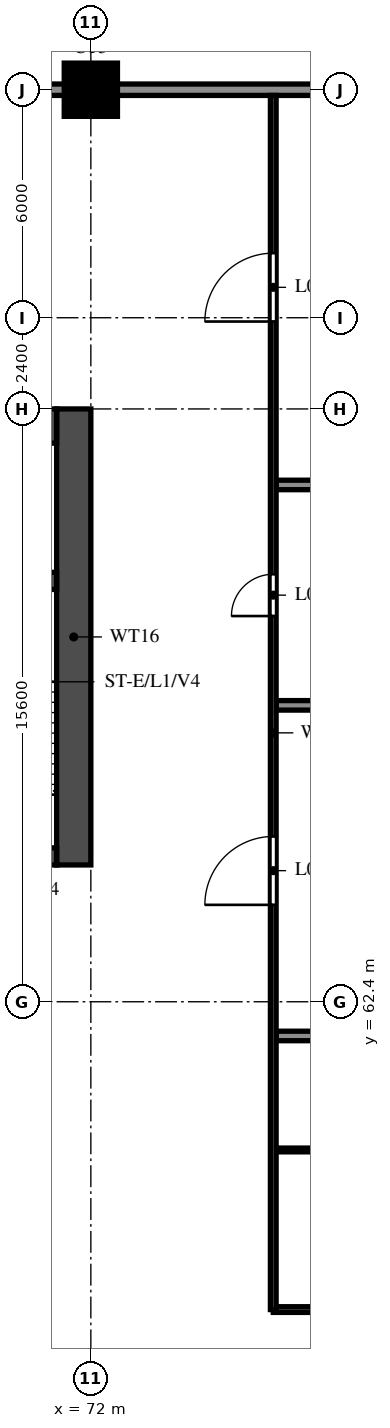
"""IFC4 building model, lengths in metres.
Left out: names, types, materials, properties, quantities, classifications, styles, units other than length and angle.
Written with IfcOpenShell. Run it as: python <this file> out.ifc"""

import sys

from ifc_helpers import new_model, si_unit, direction, frame, frame_2d, origin, origin_2d, place, context, subcontext, project, spatial, rectangle, circle, extrude, source, transform, mapped, element, fill, save


model = new_model("IFC4")
c1 = context("Model", 3, precision=1e-05, world=origin(), true_north=direction((0.0, 1.0)))
c2 = subcontext(c1, "Body", "Model", "MODEL_VIEW")
j1 = project(units=[si_unit("LENGTHUNIT", "METRE"), si_unit("PLANEANGLEUNIT", "RADIAN")], contexts=[c1])
p1 = place(None, origin())
s1 = spatial("IfcSite", under=j1, at=p1, CompositionType="ELEMENT")
p2 = place(p1, origin())
s2 = spatial("IfcBuilding", under=s1, at=p2, CompositionType="ELEMENT")
p3 = place(p2, frame((0.0, 0.0, 17.4)))
s3 = spatial("IfcBuildingStorey", under=s2, at=p3, CompositionType="ELEMENT", Elevation=17.4)
m1 = source(origin(), c2, "Body", "SweptSolid", [
    extrude(circle(Radius=0.7, at=origin_2d()), origin(), (0.0, 0.0, 1.0), 3.8),
])
p4 = place(p3, frame((72.0, 86.4, 0.0), z_axis=(0.0, 0.0, 1.0), x_axis=(1.0, 0.0, 0.0)))
e1 = element("IfcColumn", 1, at=p4, inside=s3, PredefinedType="COLUMN", context=c2, shape_type="MappedRepresentation", body=[
    mapped(m1, transform((0.0, 0.0, 0.0))),
])
p5 = place(p3, frame((71.55, 66.0, 0.0), z_axis=(0.0, 0.0, 1.0), x_axis=(0.0, 1.0, 0.0)))
e2 = element("IfcWall", 2, at=p5, inside=s3, PredefinedType="SHEAR", context=c2, shape_type="SweptSolid", body=[
    extrude(rectangle(XDim=12.0, YDim=0.9, at=frame_2d((6.0, 0.0))), origin(), (0.0, 0.0, 1.0), 3.8),
])
p6 = place(p3, frame((29.7, 77.55, 0.0), z_axis=(0.0, 0.0, 1.0), x_axis=(1.0, 0.0, 0.0)))
e3 = element("IfcWall", 3, at=p6, inside=s3, PredefinedType="SHEAR", context=c2, shape_type="SweptSolid", body=[
    extrude(rectangle(XDim=41.4, YDim=0.9, at=frame_2d((20.7, 0.0))), origin(), (0.0, 0.0, 1.0), 3.8),
])
p7 = place(p3, frame((29.7, 66.225, 0.0), z_axis=(0.0, 0.0, 1.0), x_axis=(1.0, 0.0, 0.0)))
e4 = element("IfcWall", 4, at=p7, inside=s3, PredefinedType="SHEAR", context=c2, shape_type="SweptSolid", body=[
    extrude(rectangle(XDim=41.4, YDim=0.45, at=frame_2d((20.7, 0.0))), origin(), (0.0, 0.0, 1.0), 3.8),
])
p8 = place(p7, frame((0.925, 0.0, 0.0)))
e5 = element("IfcOpeningElement", 5, at=p8, cuts=e4, PredefinedType="OPENING", context=c2, shape_type="SweptSolid", body=[
    extrude(rectangle(XDim=1.1, YDim=2.1, at=frame_2d((0.55, 1.05))), frame((0.0, 0.235, 0.0), z_axis=(0.0, -1.0, 0.0), x_axis=(1.0, 0.0, 0.0)), (0.0, 0.0, 1.0), 0.47),
])
p9 = place(p7, frame((3.738, 0.0, 0.0)))
e6 = element("IfcOpeningElement", 6, at=p9, cuts=e4, PredefinedType="OPENING", context=c2, shape_type="SweptSolid", body=[
    extrude(rectangle(XDim=1.8, YDim=2.1, at=frame_2d((0.9, 1.05))), frame((0.0, 0.235, 0.0), z_axis=(0.0, -1.0, 0.0), x_axis=(1.0, 0.0, 0.0)), (0.0, 0.0, 1.0), 0.47),
])
p10 = place(p3, frame((67.925, 73.475, 0.0), z_axis=(0.0, 0.0, 1.0), x_axis=(1.0, 0.0, 0.0)))
e7 = element("IfcWall", 7, at=p10, inside=s3, PredefinedType="SHEAR", context=c2, shape_type="SweptSolid", body=[
    extrude(rectangle(XDim=3.175, YDim=0.45, at=frame_2d((1.587, 0.0))), origin(), (0.0, 0.0, 1.0), 3.8),
])
p11 = place(p3, frame((76.8, 54.3, 0.0), z_axis=(0.0, 0.0, 1.0), x_axis=(1.0, 0.0, 0.0)))
e8 = element("IfcWall", 8, at=p11, inside=s3, PredefinedType="PARTITIONING", context=c2, shape_type="SweptSolid", body=[
    extrude(rectangle(XDim=19.75, YDim=0.15, at=frame_2d((9.875, 0.0))), origin(), (0.0, 0.0, 1.0), 2.6),
])
p12 = place(p11, frame((6.65, 0.0, 0.0)))
e9 = element("IfcOpeningElement", 9, at=p12, cuts=e8, PredefinedType="OPENING", context=c2, shape_type="SweptSolid", body=[
    extrude(rectangle(XDim=1.1, YDim=2.1, at=frame_2d((0.55, 1.05))), frame((0.0, 0.085, 0.0), z_axis=(0.0, -1.0, 0.0), x_axis=(1.0, 0.0, 0.0)), (0.0, 0.0, 1.0), 0.17),
])
p13 = place(p3, frame((76.875, 58.5, 0.0), z_axis=(0.0, 0.0, 1.0), x_axis=(1.0, 0.0, 0.0)))
e10 = element("IfcWall", 10, at=p13, inside=s3, PredefinedType="PARTITIONING", context=c2, shape_type="SweptSolid", body=[
    extrude(rectangle(XDim=4.675, YDim=0.1, at=frame_2d((2.337, 0.0))), origin(), (0.0, 0.0, 1.0), 2.6),
])
p14 = place(p3, frame((76.875, 61.5, 0.0), z_axis=(0.0, 0.0, 1.0), x_axis=(1.0, 0.0, 0.0)))
e11 = element("IfcWall", 11, at=p14, inside=s3, PredefinedType="SOLIDWALL", context=c2, shape_type="SweptSolid", body=[
    extrude(rectangle(XDim=14.325, YDim=0.25, at=frame_2d((7.163, 0.0))), origin(), (0.0, 0.0, 1.0), 2.6),
])
for number, where, z_axis, x_axis in (
    (12, (76.875, 70.2, 0.0), (0.0, 0.0, 1.0), (1.0, 0.0, 0.0)),
    (13, (76.875, 76.0, 0.0), (0.0, 0.0, 1.0), (1.0, 0.0, 0.0)),
):
    element("IfcWall", number, at=place(p3, frame(where, z_axis=z_axis, x_axis=x_axis)), inside=s3, PredefinedType="SOLIDWALL", context=c2, shape_type="SweptSolid", body=[
        extrude(rectangle(XDim=23.775, YDim=0.25, at=frame_2d((11.887, 0.0))), origin(), (0.0, 0.0, 1.0), 2.6),
    ])
p15 = place(p3, frame((0.0, 86.4, 0.0), z_axis=(0.0, 0.0, 1.0), x_axis=(1.0, 0.0, 0.0)))
e14 = element("IfcWall", 14, at=p15, inside=s3, PredefinedType="SOLIDWALL", context=c2, shape_type="SweptSolid", body=[
    extrude(rectangle(XDim=100.8, YDim=0.3, at=frame_2d((50.4, 0.0))), origin(), (0.0, 0.0, 1.0), 3.8),
])
p16 = place(p15, frame((2.4, 0.0, 0.6)))
e15 = element("IfcOpeningElement", 15, at=p16, cuts=e14, PredefinedType="OPENING", context=c2, shape_type="SweptSolid", body=[
    extrude(rectangle(XDim=1.8, YDim=2.4, at=frame_2d((0.9, 1.2))), frame((0.0, 0.16, 0.0), z_axis=(0.0, -1.0, 0.0), x_axis=(1.0, 0.0, 0.0)), (0.0, 0.0, 1.0), 0.32),
])
p17 = place(p15, frame((6.0, 0.0, 0.6)))
e16 = element("IfcOpeningElement", 16, at=p17, cuts=e14, PredefinedType="OPENING", context=c2, shape_type="SweptSolid", body=[
    extrude(rectangle(XDim=1.8, YDim=2.4, at=frame_2d((0.9, 1.2))), frame((0.0, 0.16, 0.0), z_axis=(0.0, -1.0, 0.0), x_axis=(1.0, 0.0, 0.0)), (0.0, 0.0, 1.0), 0.32),
])
p18 = place(p15, frame((9.6, 0.0, 0.6)))
e17 = element("IfcOpeningElement", 17, at=p18, cuts=e14, PredefinedType="OPENING", context=c2, shape_type="SweptSolid", body=[
    extrude(rectangle(XDim=1.8, YDim=2.4, at=frame_2d((0.9, 1.2))), frame((0.0, 0.16, 0.0), z_axis=(0.0, -1.0, 0.0), x_axis=(1.0, 0.0, 0.0)), (0.0, 0.0, 1.0), 0.32),
])
p19 = place(p15, frame((16.8, 0.0, 0.6)))
e18 = element("IfcOpeningElement", 18, at=p19, cuts=e14, PredefinedType="OPENING", context=c2, shape_type="SweptSolid", body=[
    extrude(rectangle(XDim=1.8, YDim=2.4, at=frame_2d((0.9, 1.2))), frame((0.0, 0.16, 0.0), z_axis=(0.0, -1.0, 0.0), x_axis=(1.0, 0.0, 0.0)), (0.0, 0.0, 1.0), 0.32),
])
p20 = place(p15, frame((20.4, 0.0, 0.6)))
e19 = element("IfcOpeningElement", 19, at=p20, cuts=e14, PredefinedType="OPENING", context=c2, shape_type="SweptSolid", body=[
    extrude(rectangle(XDim=1.8, YDim=2.4, at=frame_2d((0.9, 1.2))), frame((0.0, 0.16, 0.0), z_axis=(0.0, -1.0, 0.0), x_axis=(1.0, 0.0, 0.0)), (0.0, 0.0, 1.0), 0.32),
])
p21 = place(p15, frame((78.0, 0.0, 0.6)))
e20 = element("IfcOpeningElement", 20, at=p21, cuts=e14, PredefinedType="OPENING", context=c2, shape_type="SweptSolid", body=[
    extrude(rectangle(XDim=1.8, YDim=2.4, at=frame_2d((0.9, 1.2))), frame((0.0, 0.16, 0.0), z_axis=(0.0, -1.0, 0.0), x_axis=(1.0, 0.0, 0.0)), (0.0, 0.0, 1.0), 0.32),
])
p22 = place(p15, frame((81.6, 0.0, 0.6)))
e21 = element("IfcOpeningElement", 21, at=p22, cuts=e14, PredefinedType="OPENING", context=c2, shape_type="SweptSolid", body=[
    extrude(rectangle(XDim=1.8, YDim=2.4, at=frame_2d((0.9, 1.2))), frame((0.0, 0.16, 0.0), z_axis=(0.0, -1.0, 0.0), x_axis=(1.0, 0.0, 0.0)), (0.0, 0.0, 1.0), 0.32),
])
p23 = place(p15, frame((88.8, 0.0, 0.6)))
e22 = element("IfcOpeningElement", 22, at=p23, cuts=e14, PredefinedType="OPENING", context=c2, shape_type="SweptSolid", body=[
    extrude(rectangle(XDim=1.8, YDim=2.4, at=frame_2d((0.9, 1.2))), frame((0.0, 0.16, 0.0), z_axis=(0.0, -1.0, 0.0), x_axis=(1.0, 0.0, 0.0)), (0.0, 0.0, 1.0), 0.32),
])
p24 = place(p15, frame((92.4, 0.0, 0.6)))
e23 = element("IfcOpeningElement", 23, at=p24, cuts=e14, PredefinedType="OPENING", context=c2, shape_type="SweptSolid", body=[
    extrude(rectangle(XDim=1.8, YDim=2.4, at=frame_2d((0.9, 1.2))), frame((0.0, 0.16, 0.0), z_axis=(0.0, -1.0, 0.0), x_axis=(1.0, 0.0, 0.0)), (0.0, 0.0, 1.0), 0.32),
])
p25 = place(p15, frame((96.0, 0.0, 0.6)))
e24 = element("IfcOpeningElement", 24, at=p25, cuts=e14, PredefinedType="OPENING", context=c2, shape_type="SweptSolid", body=[
    extrude(rectangle(XDim=1.8, YDim=2.4, at=frame_2d((0.9, 1.2))), frame((0.0, 0.16, 0.0), z_axis=(0.0, -1.0, 0.0), x_axis=(1.0, 0.0, 0.0)), (0.0, 0.0, 1.0), 0.32),
])
p26 = place(p3, frame((76.8, 54.3, 0.0), z_axis=(0.0, 0.0, 1.0), x_axis=(0.0, 1.0, 0.0)))
e25 = element("IfcWall", 25, at=p26, inside=s3, PredefinedType="PARTITIONING", context=c2, shape_type="SweptSolid", body=[
    extrude(rectangle(XDim=31.95, YDim=0.15, at=frame_2d((15.975, 0.0))), origin(), (0.0, 0.0, 1.0), 2.6),
])
p27 = place(p26, frame((10.65, 0.0, 0.0)))
e26 = element("IfcOpeningElement", 26, at=p27, cuts=e25, PredefinedType="OPENING", context=c2, shape_type="SweptSolid", body=[
    extrude(rectangle(XDim=1.8, YDim=2.1, at=frame_2d((0.9, 1.05))), frame((0.0, 0.085, 0.0), z_axis=(0.0, -1.0, 0.0), x_axis=(1.0, 0.0, 0.0)), (0.0, 0.0, 1.0), 0.17),
])
p28 = place(p26, frame((18.25, 0.0, 0.0)))
e27 = element("IfcOpeningElement", 27, at=p28, cuts=e25, PredefinedType="OPENING", context=c2, shape_type="SweptSolid", body=[
    extrude(rectangle(XDim=1.1, YDim=2.1, at=frame_2d((0.55, 1.05))), frame((0.0, 0.085, 0.0), z_axis=(0.0, -1.0, 0.0), x_axis=(1.0, 0.0, 0.0)), (0.0, 0.0, 1.0), 0.17),
])
p29 = place(p26, frame((26.0, 0.0, 0.0)))
e28 = element("IfcOpeningElement", 28, at=p29, cuts=e25, PredefinedType="OPENING", context=c2, shape_type="SweptSolid", body=[
    extrude(rectangle(XDim=1.8, YDim=2.1, at=frame_2d((0.9, 1.05))), frame((0.0, 0.085, 0.0), z_axis=(0.0, -1.0, 0.0), x_axis=(1.0, 0.0, 0.0)), (0.0, 0.0, 1.0), 0.17),
])
p30 = place(p27, origin())
e29 = element("IfcDoor", 29, at=p30, inside=s3, OperationType="DOUBLE_DOOR_SINGLE_SWING", PredefinedType="DOOR", context=c2, shape_type="SweptSolid", body=[
    extrude(rectangle(XDim=1.8, YDim=2.1, at=frame_2d((0.9, 1.05))), frame((0.0, 0.025, 0.0), z_axis=(0.0, -1.0, 0.0), x_axis=(1.0, 0.0, 0.0)), (0.0, 0.0, 1.0), 0.05),
])
fill(e26, e29)
p31 = place(p28, origin())
e30 = element("IfcDoor", 30, at=p31, inside=s3, OperationType="SINGLE_SWING_RIGHT", PredefinedType="DOOR", context=c2, shape_type="SweptSolid", body=[
    extrude(rectangle(XDim=1.1, YDim=2.1, at=frame_2d((0.55, 1.05))), frame((0.0, 0.025, 0.0), z_axis=(0.0, -1.0, 0.0), x_axis=(1.0, 0.0, 0.0)), (0.0, 0.0, 1.0), 0.05),
])
fill(e27, e30)
p32 = place(p29, origin())
e31 = element("IfcDoor", 31, at=p32, inside=s3, OperationType="DOUBLE_DOOR_SINGLE_SWING", PredefinedType="DOOR", context=c2, shape_type="SweptSolid", body=[
    extrude(rectangle(XDim=1.8, YDim=2.1, at=frame_2d((0.9, 1.05))), frame((0.0, 0.025, 0.0), z_axis=(0.0, -1.0, 0.0), x_axis=(1.0, 0.0, 0.0)), (0.0, 0.0, 1.0), 0.05),
])
fill(e28, e31)
save(model, sys.argv[1])
